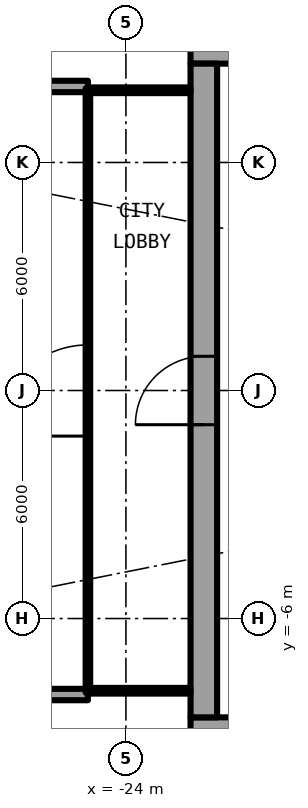
"""IFC4 building model, lengths in metres.
Left out: names, types, materials, properties, quantities, classifications, styles, units other than length and angle.
Written with IfcOpenShell. Run it as: python <this file> out.ifc"""

import sys

from ifc_helpers import new_model, si_unit, direction, frame, frame_2d, origin, place, context, subcontext, project, spatial, rectangle, extrude, element, fill, save


model = new_model("IFC4")
c1 = context("Model", 3, precision=1e-05, world=origin(), true_north=direction((0.0, 1.0)))
c2 = subcontext(c1, "Body", "Model", "MODEL_VIEW")
j1 = project(units=[si_unit("LENGTHUNIT", "METRE"), si_unit("PLANEANGLEUNIT", "RADIAN")], contexts=[c1])
p1 = place(None, origin())
s1 = spatial("IfcSite", under=j1, at=p1, CompositionType="ELEMENT")
p2 = place(p1, origin())
s2 = spatial("IfcBuilding", under=s1, at=p2, CompositionType="ELEMENT")
p3 = place(p2, frame((0.0, 0.0, 63.6)))
s3 = spatial("IfcBuildingStorey", under=s2, at=p3, CompositionType="ELEMENT", Elevation=63.6)
for number, where, z_axis, x_axis in (
    (1, (-25.0, 8.0, 0.0), (0.0, 0.0, 1.0), (-1.0, 0.0, 0.0)),
    (2, (-25.0, -8.0, 0.0), (0.0, 0.0, 1.0), (-1.0, 0.0, 0.0)),
):
    element("IfcWall", number, at=place(p3, frame(where, z_axis=z_axis, x_axis=x_axis)), inside=s3, PredefinedType="SOLIDWALL", context=c2, shape_type="SweptSolid", body=[
        extrude(rectangle(XDim=2.667, YDim=0.3, at=frame_2d((1.333, 0.0))), origin(), (0.0, 0.0, 1.0), 2.7),
    ])
p4 = place(p3, frame((-22.3, -8.95, 0.0), z_axis=(0.0, 0.0, 1.0), x_axis=(1.0, 0.0, 0.0)))
e3 = element("IfcWall", 3, at=p4, inside=s3, PredefinedType="SHEAR", context=c2, shape_type="SweptSolid", body=[
    extrude(rectangle(XDim=14.0, YDim=0.7, at=frame_2d((7.0, 0.0))), origin(), (0.0, 0.0, 1.0), 3.05),
])
p5 = place(p4, frame((1.225, 0.0, 0.0)))
e4 = element("IfcOpeningElement", 4, at=p5, cuts=e3, PredefinedType="OPENING", context=c2, shape_type="SweptSolid", body=[
    extrude(rectangle(XDim=1.2, YDim=2.3, at=frame_2d((0.6, 1.15))), frame((0.0, 0.36, 0.0), z_axis=(0.0, -1.0, 0.0), x_axis=(1.0, 0.0, 0.0)), (0.0, 0.0, 1.0), 0.72),
])
p6 = place(p3, frame((-8.3, 8.95, 0.0), z_axis=(0.0, 0.0, 1.0), x_axis=(-1.0, 0.0, 0.0)))
e5 = element("IfcWall", 5, at=p6, inside=s3, PredefinedType="SHEAR", context=c2, shape_type="SweptSolid", body=[
    extrude(rectangle(XDim=14.0, YDim=0.7, at=frame_2d((7.0, 0.0))), origin(), (0.0, 0.0, 1.0), 3.05),
])
p7 = place(p6, frame((11.575, 0.0, 0.0)))
e6 = element("IfcOpeningElement", 6, at=p7, cuts=e5, PredefinedType="OPENING", context=c2, shape_type="SweptSolid", body=[
    extrude(rectangle(XDim=1.2, YDim=2.3, at=frame_2d((0.6, 1.15))), frame((0.0, 0.36, 0.0), z_axis=(0.0, -1.0, 0.0), x_axis=(1.0, 0.0, 0.0)), (0.0, 0.0, 1.0), 0.72),
])
p8 = place(p3, frame((-21.95, -8.6, 0.0), z_axis=(0.0, 0.0, 1.0), x_axis=(0.0, 1.0, 0.0)))
e7 = element("IfcWall", 7, at=p8, inside=s3, PredefinedType="SHEAR", context=c2, shape_type="SweptSolid", body=[
    extrude(rectangle(XDim=17.2, YDim=0.7, at=frame_2d((8.6, 0.0))), origin(), (0.0, 0.0, 1.0), 3.05),
])
p9 = place(p8, frame((7.7, 0.0, 0.0)))
e8 = element("IfcOpeningElement", 8, at=p9, cuts=e7, PredefinedType="OPENING", context=c2, shape_type="SweptSolid", body=[
    extrude(rectangle(XDim=1.8, YDim=2.3, at=frame_2d((0.9, 1.15))), frame((0.0, 0.36, 0.0), z_axis=(0.0, -1.0, 0.0), x_axis=(1.0, 0.0, 0.0)), (0.0, 0.0, 1.0), 0.72),
])
for number, where, z_axis, x_axis in (
    (9, (-22.3, 7.9, 0.0), (0.0, 0.0, 1.0), (-1.0, 0.0, 0.0)),
    (10, (-22.3, -7.9, 0.0), (0.0, 0.0, 1.0), (-1.0, 0.0, 0.0)),
):
    element("IfcWall", number, at=place(p3, frame(where, z_axis=z_axis, x_axis=x_axis)), inside=s3, PredefinedType="PARTITIONING", context=c2, shape_type="SweptSolid", body=[
        extrude(rectangle(XDim=2.64, YDim=0.15, at=frame_2d((1.32, 0.0))), origin(), (0.0, 0.0, 1.0), 2.7),
    ])
p10 = place(p3, frame((-25.0, -7.95, 0.0), z_axis=(0.0, 0.0, 1.0), x_axis=(0.0, 1.0, 0.0)))
e11 = element("IfcWall", 11, at=p10, inside=s3, PredefinedType="PARTITIONING", context=c2, shape_type="SweptSolid", body=[
    extrude(rectangle(XDim=15.9, YDim=0.12, at=frame_2d((7.95, 0.0))), origin(), (0.0, 0.0, 1.0), 2.7),
])
p11 = place(p10, frame((6.75, 0.0, 0.0)))
e12 = element("IfcOpeningElement", 12, at=p11, cuts=e11, PredefinedType="OPENING", context=c2, shape_type="SweptSolid", body=[
    extrude(rectangle(XDim=2.4, YDim=2.3, at=frame_2d((1.2, 1.15))), frame((0.0, 0.07, 0.0), z_axis=(0.0, -1.0, 0.0), x_axis=(1.0, 0.0, 0.0)), (0.0, 0.0, 1.0), 0.14),
])
p12 = place(p10, frame((11.55, 0.0, 0.1)))
e13 = element("IfcOpeningElement", 13, at=p12, cuts=e11, PredefinedType="OPENING", context=c2, shape_type="SweptSolid", body=[
    extrude(rectangle(XDim=3.4, YDim=2.35, at=frame_2d((1.7, 1.175))), frame((0.0, 0.07, 0.0), z_axis=(0.0, -1.0, 0.0), x_axis=(1.0, 0.0, 0.0)), (0.0, 0.0, 1.0), 0.14),
])
p13 = place(p10, frame((0.95, 0.0, 0.1)))
e14 = element("IfcOpeningElement", 14, at=p13, cuts=e11, PredefinedType="OPENING", context=c2, shape_type="SweptSolid", body=[
    extrude(rectangle(XDim=3.4, YDim=2.35, at=frame_2d((1.7, 1.175))), frame((0.0, 0.07, 0.0), z_axis=(0.0, -1.0, 0.0), x_axis=(1.0, 0.0, 0.0)), (0.0, 0.0, 1.0), 0.14),
])
p14 = place(p9, origin())
e15 = element("IfcDoor", 15, at=p14, inside=s3, OperationType="SINGLE_SWING_LEFT", PredefinedType="DOOR", context=c2, shape_type="SweptSolid", body=[
    extrude(rectangle(XDim=1.8, YDim=2.3, at=frame_2d((0.9, 1.15))), frame((0.0, 0.025, 0.0), z_axis=(0.0, -1.0, 0.0), x_axis=(1.0, 0.0, 0.0)), (0.0, 0.0, 1.0), 0.05),
])
fill(e8, e15)
p15 = place(p11, origin())
e16 = element("IfcDoor", 16, at=p15, inside=s3, OperationType="SINGLE_SWING_LEFT", PredefinedType="DOOR", context=c2, shape_type="SweptSolid", body=[
    extrude(rectangle(XDim=2.4, YDim=2.3, at=frame_2d((1.2, 1.15))), frame((0.0, 0.025, 0.0), z_axis=(0.0, -1.0, 0.0), x_axis=(1.0, 0.0, 0.0)), (0.0, 0.0, 1.0), 0.05),
])
fill(e12, e16)
p16 = place(p12, origin())
e17 = element("IfcWindow", 17, at=p16, inside=s3, PartitioningType="SINGLE_PANEL", PredefinedType="WINDOW", context=c2, shape_type="SweptSolid", body=[
    extrude(rectangle(XDim=3.4, YDim=2.35, at=frame_2d((1.7, 1.175))), frame((0.0, 0.03, 0.0), z_axis=(0.0, -1.0, 0.0), x_axis=(1.0, 0.0, 0.0)), (0.0, 0.0, 1.0), 0.06),
])
fill(e13, e17)
p17 = place(p13, origin())
e18 = element("IfcWindow", 18, at=p17, inside=s3, PartitioningType="SINGLE_PANEL", PredefinedType="WINDOW", context=c2, shape_type="SweptSolid", body=[
    extrude(rectangle(XDim=3.4, YDim=2.35, at=frame_2d((1.7, 1.175))), frame((0.0, 0.03, 0.0), z_axis=(0.0, -1.0, 0.0), x_axis=(1.0, 0.0, 0.0)), (0.0, 0.0, 1.0), 0.06),
])
fill(e14, e18)
save(model, sys.argv[1])
